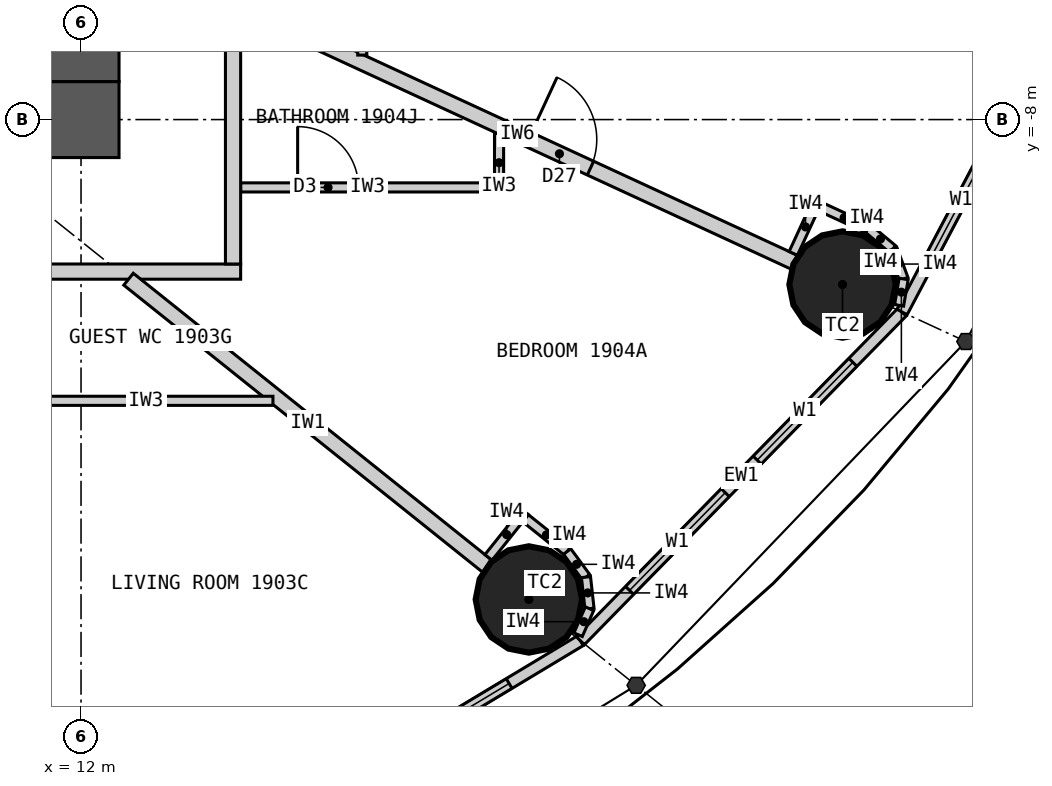
"""IFC4 building model, lengths in metres.
Left out: names, types, materials, properties, quantities, classifications, styles, units other than length and angle.
Written with IfcOpenShell. Run it as: python <this file> out.ifc"""

import sys

from ifc_helpers import new_model, si_unit, direction, frame, frame_2d, origin, origin_2d, place, context, subcontext, project, spatial, rectangle, circle, extrude, element, fill, save


model = new_model("IFC4")
c1 = context("Model", 3, precision=1e-05, world=origin(), true_north=direction((0.0, 1.0)))
c2 = subcontext(c1, "Body", "Model", "MODEL_VIEW")
j1 = project(units=[si_unit("LENGTHUNIT", "METRE"), si_unit("PLANEANGLEUNIT", "RADIAN")], contexts=[c1])
p1 = place(None, origin())
s1 = spatial("IfcSite", under=j1, at=p1, CompositionType="ELEMENT")
p2 = place(p1, origin())
s2 = spatial("IfcBuilding", under=s1, at=p2, CompositionType="ELEMENT")
p3 = place(p2, frame((0.0, 0.0, 77.1)))
s3 = spatial("IfcBuildingStorey", under=s2, at=p3, CompositionType="ELEMENT", Elevation=77.1)
for number, where, z_axis, x_axis in (
    (1, (17.892, -14.313, 0.0), (0.0, 0.0, 1.0), (1.0, 0.0, 0.0)),
    (2, (22.019, -10.17, 0.0), (0.0, 0.0, 1.0), (1.0, 0.0, 0.0)),
):
    element("IfcColumn", number, at=place(p3, frame(where, z_axis=z_axis, x_axis=x_axis)), inside=s3, PredefinedType="COLUMN", context=c2, shape_type="SweptSolid", body=[
        extrude(circle(Radius=0.7, at=origin_2d()), origin(), (0.0, 0.0, 1.0), 3.3),
    ])
p4 = place(p3, frame((12.5, -8.0, 0.0), z_axis=(0.0, 0.0, 1.0), x_axis=(-1.0, 0.0, 0.0)))
e3 = element("IfcWall", 3, at=p4, inside=s3, PredefinedType="SHEAR", context=c2, shape_type="SweptSolid", body=[
    extrude(rectangle(XDim=25.0, YDim=1.0, at=frame_2d((12.5, 0.0))), origin(), (0.0, 0.0, 1.0), 3.3),
])
p5 = place(p4, frame((11.2, 0.0, 0.0)))
e4 = element("IfcOpeningElement", 4, at=p5, cuts=e3, PredefinedType="OPENING", context=c2, shape_type="SweptSolid", body=[
    extrude(rectangle(XDim=1.2, YDim=2.2, at=frame_2d((0.6, 1.1))), frame((0.0, 0.51, 0.0), z_axis=(0.0, -1.0, 0.0), x_axis=(1.0, 0.0, 0.0)), (0.0, 0.0, 1.0), 1.02),
])
p6 = place(p4, frame((18.8, 0.0, 0.0)))
e5 = element("IfcOpeningElement", 5, at=p6, cuts=e3, PredefinedType="OPENING", context=c2, shape_type="SweptSolid", body=[
    extrude(rectangle(XDim=0.9, YDim=2.2, at=frame_2d((0.45, 1.1))), frame((0.0, 0.51, 0.0), z_axis=(0.0, -1.0, 0.0), x_axis=(1.0, 0.0, 0.0)), (0.0, 0.0, 1.0), 1.02),
])
p7 = place(p3, frame((12.0, -7.5, 0.0), z_axis=(0.0, 0.0, 1.0), x_axis=(0.0, 1.0, 0.0)))
e6 = element("IfcWall", 6, at=p7, inside=s3, PredefinedType="SHEAR", context=c2, shape_type="SweptSolid", body=[
    extrude(rectangle(XDim=15.0, YDim=1.0, at=frame_2d((7.5, 0.0))), origin(), (0.0, 0.0, 1.0), 3.3),
])
p8 = place(p7, frame((6.6, 0.0, 0.0)))
e7 = element("IfcOpeningElement", 7, at=p8, cuts=e6, PredefinedType="OPENING", context=c2, shape_type="SweptSolid", body=[
    extrude(rectangle(XDim=1.8, YDim=2.2, at=frame_2d((0.9, 1.1))), frame((0.0, 0.51, 0.0), z_axis=(0.0, -1.0, 0.0), x_axis=(1.0, 0.0, 0.0)), (0.0, 0.0, 1.0), 1.02),
])
p9 = place(p3, frame((13.096, -18.147, 0.0), z_axis=(0.0, 0.0, 1.0), x_axis=(0.856983180864, 0.515344377787, 0.0)))
e8 = element("IfcWall", 8, at=p9, inside=s3, PredefinedType="ELEMENTEDWALL", context=c2, shape_type="SweptSolid", body=[
    extrude(rectangle(XDim=6.386, YDim=0.15, at=frame_2d((3.193, 0.0))), origin(), (0.0, 0.0, 1.0), 3.12),
])
p10 = place(p9, frame((1.093, 0.0, 0.9)))
e9 = element("IfcOpeningElement", 9, at=p10, cuts=e8, PredefinedType="OPENING", context=c2, shape_type="SweptSolid", body=[
    extrude(rectangle(XDim=1.8, YDim=1.9, at=frame_2d((0.9, 0.95))), frame((0.0, 0.085, 0.0), z_axis=(0.0, -1.0, 0.0), x_axis=(1.0, 0.0, 0.0)), (0.0, 0.0, 1.0), 0.17),
])
p11 = place(p9, frame((3.493, 0.0, 0.9)))
e10 = element("IfcOpeningElement", 10, at=p11, cuts=e8, PredefinedType="OPENING", context=c2, shape_type="SweptSolid", body=[
    extrude(rectangle(XDim=1.8, YDim=1.9, at=frame_2d((0.9, 0.95))), frame((0.0, 0.085, 0.0), z_axis=(0.0, -1.0, 0.0), x_axis=(1.0, 0.0, 0.0)), (0.0, 0.0, 1.0), 0.17),
])
p12 = place(p3, frame((18.57, -14.856, 0.0), z_axis=(0.0, 0.0, 1.0), x_axis=(0.699602905915, 0.714531856557, 0.0)))
e11 = element("IfcWall", 11, at=p12, inside=s3, PredefinedType="ELEMENTEDWALL", context=c2, shape_type="SweptSolid", body=[
    extrude(rectangle(XDim=6.051, YDim=0.15, at=frame_2d((3.025, 0.0))), origin(), (0.0, 0.0, 1.0), 3.12),
])
p13 = place(p12, frame((0.926, 0.0, 0.9)))
e12 = element("IfcOpeningElement", 12, at=p13, cuts=e11, PredefinedType="OPENING", context=c2, shape_type="SweptSolid", body=[
    extrude(rectangle(XDim=1.8, YDim=1.9, at=frame_2d((0.9, 0.95))), frame((0.0, 0.085, 0.0), z_axis=(0.0, -1.0, 0.0), x_axis=(1.0, 0.0, 0.0)), (0.0, 0.0, 1.0), 0.17),
])
p14 = place(p12, frame((3.325, 0.0, 0.9)))
e13 = element("IfcOpeningElement", 13, at=p14, cuts=e11, PredefinedType="OPENING", context=c2, shape_type="SweptSolid", body=[
    extrude(rectangle(XDim=1.8, YDim=1.9, at=frame_2d((0.9, 0.95))), frame((0.0, 0.085, 0.0), z_axis=(0.0, -1.0, 0.0), x_axis=(1.0, 0.0, 0.0)), (0.0, 0.0, 1.0), 0.17),
])
p15 = place(p3, frame((22.803, -10.532, 0.0), z_axis=(0.0, 0.0, 1.0), x_axis=(0.467296867008, 0.884100468321, 0.0)))
e14 = element("IfcWall", 14, at=p15, inside=s3, PredefinedType="ELEMENTEDWALL", context=c2, shape_type="SweptSolid", body=[
    extrude(rectangle(XDim=5.734, YDim=0.15, at=frame_2d((2.867, 0.0))), origin(), (0.0, 0.0, 1.0), 3.12),
])
p16 = place(p15, frame((0.767, 0.0, 0.9)))
e15 = element("IfcOpeningElement", 15, at=p16, cuts=e14, PredefinedType="OPENING", context=c2, shape_type="SweptSolid", body=[
    extrude(rectangle(XDim=1.8, YDim=1.9, at=frame_2d((0.9, 0.95))), frame((0.0, 0.085, 0.0), z_axis=(0.0, -1.0, 0.0), x_axis=(1.0, 0.0, 0.0)), (0.0, 0.0, 1.0), 0.17),
])
p17 = place(p15, frame((3.167, 0.0, 0.9)))
e16 = element("IfcOpeningElement", 16, at=p17, cuts=e14, PredefinedType="OPENING", context=c2, shape_type="SweptSolid", body=[
    extrude(rectangle(XDim=1.8, YDim=1.9, at=frame_2d((0.9, 0.95))), frame((0.0, 0.085, 0.0), z_axis=(0.0, -1.0, 0.0), x_axis=(1.0, 0.0, 0.0)), (0.0, 0.0, 1.0), 0.17),
])
p18 = place(p3, frame((14.1, -10.0, 0.0), z_axis=(0.0, 0.0, 1.0), x_axis=(-1.0, 0.0, 0.0)))
e17 = element("IfcWall", 17, at=p18, inside=s3, PredefinedType="PARTITIONING", context=c2, shape_type="SweptSolid", body=[
    extrude(rectangle(XDim=28.2, YDim=0.2, at=frame_2d((14.1, 0.0))), origin(), (0.0, 0.0, 1.0), 3.12),
])
p19 = place(p18, frame((24.165, 0.0, 0.0)))
e18 = element("IfcOpeningElement", 18, at=p19, cuts=e17, PredefinedType="OPENING", context=c2, shape_type="SweptSolid", body=[
    extrude(rectangle(XDim=1.0, YDim=2.2, at=frame_2d((0.5, 1.1))), frame((0.0, 0.11, 0.0), z_axis=(0.0, -1.0, 0.0), x_axis=(1.0, 0.0, 0.0)), (0.0, 0.0, 1.0), 0.22),
])
p20 = place(p18, frame((14.923, 0.0, 0.0)))
e19 = element("IfcOpeningElement", 19, at=p20, cuts=e17, PredefinedType="OPENING", context=c2, shape_type="SweptSolid", body=[
    extrude(rectangle(XDim=1.0, YDim=2.2, at=frame_2d((0.5, 1.1))), frame((0.0, 0.11, 0.0), z_axis=(0.0, -1.0, 0.0), x_axis=(1.0, 0.0, 0.0)), (0.0, 0.0, 1.0), 0.22),
])
p21 = place(p18, frame((3.035, 0.0, 0.0)))
e20 = element("IfcOpeningElement", 20, at=p21, cuts=e17, PredefinedType="OPENING", context=c2, shape_type="SweptSolid", body=[
    extrude(rectangle(XDim=1.0, YDim=2.2, at=frame_2d((0.5, 1.1))), frame((0.0, 0.11, 0.0), z_axis=(0.0, -1.0, 0.0), x_axis=(1.0, 0.0, 0.0)), (0.0, 0.0, 1.0), 0.22),
])
p22 = place(p3, frame((7.289, -10.1, 0.0), z_axis=(0.0, 0.0, 1.0), x_axis=(0.585198353053, -0.810890182197, 0.0)))
e21 = element("IfcWall", 21, at=p22, inside=s3, PredefinedType="PARTITIONING", context=c2, shape_type="SweptSolid", body=[
    extrude(rectangle(XDim=8.36, YDim=0.2, at=frame_2d((4.18, 0.0))), origin(), (0.0, 0.0, 1.0), 2.32),
])
p23 = place(p22, frame((0.72, 0.0, 0.0)))
e22 = element("IfcOpeningElement", 22, at=p23, cuts=e21, PredefinedType="OPENING", context=c2, shape_type="SweptSolid", body=[
    extrude(rectangle(XDim=0.9, YDim=2.1, at=frame_2d((0.45, 1.05))), frame((0.0, 0.11, 0.0), z_axis=(0.0, -1.0, 0.0), x_axis=(1.0, 0.0, 0.0)), (0.0, 0.0, 1.0), 0.22),
])
p24 = place(p3, frame((12.625, -10.1, 0.0), z_axis=(0.0, 0.0, 1.0), x_axis=(0.780892451574, -0.624665493744, 0.0)))
e23 = element("IfcWall", 23, at=p24, inside=s3, PredefinedType="PARTITIONING", context=c2, shape_type="SweptSolid", body=[
    extrude(rectangle(XDim=6.045, YDim=0.2, at=frame_2d((3.022, 0.0))), origin(), (0.0, 0.0, 1.0), 2.32),
])
p25 = place(p3, frame((14.1, -6.512, 0.0), z_axis=(0.0, 0.0, 1.0), x_axis=(0.907832871056, -0.419332181247, 0.0)))
e24 = element("IfcWall", 24, at=p25, inside=s3, PredefinedType="PARTITIONING", context=c2, shape_type="SweptSolid", body=[
    extrude(rectangle(XDim=8.023, YDim=0.2, at=frame_2d((4.011, 0.0))), origin(), (0.0, 0.0, 1.0), 2.32),
])
p26 = place(p25, frame((4.17, 0.0, 0.0)))
e25 = element("IfcOpeningElement", 25, at=p26, cuts=e24, PredefinedType="OPENING", context=c2, shape_type="SweptSolid", body=[
    extrude(rectangle(XDim=0.9, YDim=2.1, at=frame_2d((0.45, 1.05))), frame((0.0, 0.11, 0.0), z_axis=(0.0, -1.0, 0.0), x_axis=(1.0, 0.0, 0.0)), (0.0, 0.0, 1.0), 0.22),
])
p27 = place(p3, frame((14.525, -11.7, 0.0), z_axis=(0.0, 0.0, 1.0), x_axis=(-1.0, 0.0, 0.0)))
e26 = element("IfcWall", 26, at=p27, inside=s3, PredefinedType="PARTITIONING", context=c2, shape_type="SweptSolid", body=[
    extrude(rectangle(XDim=3.34, YDim=0.12, at=frame_2d((1.67, 0.0))), origin(), (0.0, 0.0, 1.0), 3.12),
])
p28 = place(p3, frame((17.5, -8.183, 0.0), z_axis=(0.0, 0.0, 1.0), x_axis=(0.0, -1.0, 0.0)))
e27 = element("IfcWall", 27, at=p28, inside=s3, PredefinedType="PARTITIONING", context=c2, shape_type="SweptSolid", body=[
    extrude(rectangle(XDim=0.77, YDim=0.12, at=frame_2d((0.385, 0.0))), origin(), (0.0, 0.0, 1.0), 3.12),
])
p29 = place(p3, frame((14.1, -8.893, 0.0), z_axis=(0.0, 0.0, 1.0), x_axis=(1.0, 0.0, 0.0)))
e28 = element("IfcWall", 28, at=p29, inside=s3, PredefinedType="PARTITIONING", context=c2, shape_type="SweptSolid", body=[
    extrude(rectangle(XDim=3.34, YDim=0.12, at=frame_2d((1.67, 0.0))), origin(), (0.0, 0.0, 1.0), 3.12),
])
p30 = place(p29, frame((0.75, 0.0, 0.0)))
e29 = element("IfcOpeningElement", 29, at=p30, cuts=e28, PredefinedType="OPENING", context=c2, shape_type="SweptSolid", body=[
    extrude(rectangle(XDim=0.8, YDim=2.1, at=frame_2d((0.4, 1.05))), frame((0.0, 0.07, 0.0), z_axis=(0.0, -1.0, 0.0), x_axis=(1.0, 0.0, 0.0)), (0.0, 0.0, 1.0), 0.14),
])
p31 = place(p3, frame((15.7, -7.152, 0.0), z_axis=(0.0, 0.0, 1.0), x_axis=(0.0, 1.0, 0.0)))
e30 = element("IfcWall", 30, at=p31, inside=s3, PredefinedType="PARTITIONING", context=c2, shape_type="SweptSolid", body=[
    extrude(rectangle(XDim=2.079, YDim=0.12, at=frame_2d((1.04, 0.0))), origin(), (0.0, 0.0, 1.0), 3.12),
])
p32 = place(p3, frame((14.0, -9.9, 0.0), z_axis=(0.0, 0.0, 1.0), x_axis=(0.0, 1.0, 0.0)))
e31 = element("IfcWall", 31, at=p32, inside=s3, PredefinedType="PARTITIONING", context=c2, shape_type="SweptSolid", body=[
    extrude(rectangle(XDim=13.232, YDim=0.2, at=frame_2d((6.616, 0.0))), origin(), (0.0, 0.0, 1.0), 3.12),
])
p33 = place(p32, frame((4.948, 0.0, 0.0)))
e32 = element("IfcOpeningElement", 32, at=p33, cuts=e31, PredefinedType="OPENING", context=c2, shape_type="SweptSolid", body=[
    extrude(rectangle(XDim=1.0, YDim=2.2, at=frame_2d((0.5, 1.1))), frame((0.0, 0.11, 0.0), z_axis=(0.0, -1.0, 0.0), x_axis=(1.0, 0.0, 0.0)), (0.0, 0.0, 1.0), 0.22),
])
p34 = place(p32, frame((8.718, 0.0, 0.0)))
e33 = element("IfcOpeningElement", 33, at=p34, cuts=e31, PredefinedType="OPENING", context=c2, shape_type="SweptSolid", body=[
    extrude(rectangle(XDim=1.0, YDim=2.2, at=frame_2d((0.5, 1.1))), frame((0.0, 0.11, 0.0), z_axis=(0.0, -1.0, 0.0), x_axis=(1.0, 0.0, 0.0)), (0.0, 0.0, 1.0), 0.22),
])
p35 = place(p32, frame((11.74, 0.0, 0.0)))
e34 = element("IfcOpeningElement", 34, at=p35, cuts=e31, PredefinedType="OPENING", context=c2, shape_type="SweptSolid", body=[
    extrude(rectangle(XDim=1.0, YDim=2.2, at=frame_2d((0.5, 1.1))), frame((0.0, 0.11, 0.0), z_axis=(0.0, -1.0, 0.0), x_axis=(1.0, 0.0, 0.0)), (0.0, 0.0, 1.0), 0.22),
])
p36 = place(p3, frame((17.361, -13.76, 0.0), z_axis=(0.0, 0.0, 1.0), x_axis=(0.624501042889, 0.781023973659, 0.0)))
e35 = element("IfcWall", 35, at=p36, inside=s3, PredefinedType="PARTITIONING", context=c2, shape_type="SweptSolid", body=[
    extrude(rectangle(XDim=0.767, YDim=0.12, at=frame_2d((0.384, 0.0))), origin(), (0.0, 0.0, 1.0), 3.12),
])
p37 = place(p3, frame((17.85, -13.246, 0.0), z_axis=(0.0, 0.0, 1.0), x_axis=(0.780902834923, -0.62465251333, 0.0)))
e36 = element("IfcWall", 36, at=p37, inside=s3, PredefinedType="PARTITIONING", context=c2, shape_type="SweptSolid", body=[
    extrude(rectangle(XDim=0.7, YDim=0.12, at=frame_2d((0.35, 0.0))), origin(), (0.0, 0.0, 1.0), 3.12),
])
for number, where, z_axis, x_axis in (
    (37, (18.396, -13.683, 0.0), (0.0, 0.0, 1.0), (0.592, -0.806, 0.0)),
    (38, (18.644, -14.02, 0.0), (0.0, 0.0, 1.0), (0.11, -0.994, 0.0)),
):
    element("IfcWall", number, at=place(p3, frame(where, z_axis=z_axis, x_axis=x_axis)), inside=s3, PredefinedType="PARTITIONING", context=c2, shape_type="SweptSolid", body=[
        extrude(rectangle(XDim=0.418, YDim=0.12, at=frame_2d((0.209, 0.0))), origin(), (0.0, 0.0, 1.0), 3.12),
    ])
p38 = place(p3, frame((18.69, -14.435, 0.0), z_axis=(0.0, 0.0, 1.0), x_axis=(-0.401093412634, -0.91603715773, 0.0)))
e39 = element("IfcWall", 39, at=p38, inside=s3, PredefinedType="PARTITIONING", context=c2, shape_type="SweptSolid", body=[
    extrude(rectangle(XDim=0.373, YDim=0.12, at=frame_2d((0.187, 0.0))), origin(), (0.0, 0.0, 1.0), 3.12),
])
p39 = place(p3, frame((21.371, -9.761, 0.0), z_axis=(0.0, 0.0, 1.0), x_axis=(0.419259891039, 0.907866258744, 0.0)))
e40 = element("IfcWall", 40, at=p39, inside=s3, PredefinedType="PARTITIONING", context=c2, shape_type="SweptSolid", body=[
    extrude(rectangle(XDim=0.768, YDim=0.12, at=frame_2d((0.384, 0.0))), origin(), (0.0, 0.0, 1.0), 3.12),
])
p40 = place(p3, frame((21.722, -9.144, 0.0), z_axis=(0.0, 0.0, 1.0), x_axis=(0.907877701396, -0.419235112208, 0.0)))
e41 = element("IfcWall", 41, at=p40, inside=s3, PredefinedType="PARTITIONING", context=c2, shape_type="SweptSolid", body=[
    extrude(rectangle(XDim=0.7, YDim=0.12, at=frame_2d((0.35, 0.0))), origin(), (0.0, 0.0, 1.0), 3.12),
])
p41 = place(p3, frame((22.358, -9.437, 0.0), z_axis=(0.0, 0.0, 1.0), x_axis=(0.768412687942, -0.639954639806, 0.0)))
e42 = element("IfcWall", 42, at=p41, inside=s3, PredefinedType="PARTITIONING", context=c2, shape_type="SweptSolid", body=[
    extrude(rectangle(XDim=0.418, YDim=0.12, at=frame_2d((0.209, 0.0))), origin(), (0.0, 0.0, 1.0), 3.12),
])
p42 = place(p3, frame((22.679, -9.705, 0.0), z_axis=(0.0, 0.0, 1.0), x_axis=(0.345164001646, -0.938542386879, 0.0)))
e43 = element("IfcWall", 43, at=p42, inside=s3, PredefinedType="PARTITIONING", context=c2, shape_type="SweptSolid", body=[
    extrude(rectangle(XDim=0.418, YDim=0.12, at=frame_2d((0.209, 0.0))), origin(), (0.0, 0.0, 1.0), 3.12),
])
p43 = place(p3, frame((22.823, -10.097, 0.0), z_axis=(0.0, 0.0, 1.0), x_axis=(-0.169674995186, -0.985500074079, 0.0)))
e44 = element("IfcWall", 44, at=p43, inside=s3, PredefinedType="PARTITIONING", context=c2, shape_type="SweptSolid", body=[
    extrude(rectangle(XDim=0.353, YDim=0.12, at=frame_2d((0.176, 0.0))), origin(), (0.0, 0.0, 1.0), 3.12),
])
p44 = place(p11, origin())
e45 = element("IfcWindow", 45, at=p44, inside=s3, PartitioningType="SINGLE_PANEL", PredefinedType="WINDOW", context=c2, shape_type="SweptSolid", body=[
    extrude(rectangle(XDim=1.8, YDim=1.9, at=frame_2d((0.9, 0.95))), frame((0.0, 0.03, 0.0), z_axis=(0.0, -1.0, 0.0), x_axis=(1.0, 0.0, 0.0)), (0.0, 0.0, 1.0), 0.06),
])
fill(e10, e45)
p45 = place(p13, origin())
e46 = element("IfcWindow", 46, at=p45, inside=s3, PartitioningType="SINGLE_PANEL", PredefinedType="WINDOW", context=c2, shape_type="SweptSolid", body=[
    extrude(rectangle(XDim=1.8, YDim=1.9, at=frame_2d((0.9, 0.95))), frame((0.0, 0.03, 0.0), z_axis=(0.0, -1.0, 0.0), x_axis=(1.0, 0.0, 0.0)), (0.0, 0.0, 1.0), 0.06),
])
fill(e12, e46)
p46 = place(p14, origin())
e47 = element("IfcWindow", 47, at=p46, inside=s3, PartitioningType="SINGLE_PANEL", PredefinedType="WINDOW", context=c2, shape_type="SweptSolid", body=[
    extrude(rectangle(XDim=1.8, YDim=1.9, at=frame_2d((0.9, 0.95))), frame((0.0, 0.03, 0.0), z_axis=(0.0, -1.0, 0.0), x_axis=(1.0, 0.0, 0.0)), (0.0, 0.0, 1.0), 0.06),
])
fill(e13, e47)
p47 = place(p16, origin())
e48 = element("IfcWindow", 48, at=p47, inside=s3, PartitioningType="SINGLE_PANEL", PredefinedType="WINDOW", context=c2, shape_type="SweptSolid", body=[
    extrude(rectangle(XDim=1.8, YDim=1.9, at=frame_2d((0.9, 0.95))), frame((0.0, 0.03, 0.0), z_axis=(0.0, -1.0, 0.0), x_axis=(1.0, 0.0, 0.0)), (0.0, 0.0, 1.0), 0.06),
])
fill(e15, e48)
p48 = place(p30, origin())
e49 = element("IfcDoor", 49, at=p48, inside=s3, OperationType="SINGLE_SWING_LEFT", PredefinedType="DOOR", context=c2, shape_type="SweptSolid", body=[
    extrude(rectangle(XDim=0.8, YDim=2.1, at=frame_2d((0.4, 1.05))), frame((0.0, 0.025, 0.0), z_axis=(0.0, -1.0, 0.0), x_axis=(1.0, 0.0, 0.0)), (0.0, 0.0, 1.0), 0.05),
])
fill(e29, e49)
p49 = place(p26, origin())
e50 = element("IfcDoor", 50, at=p49, inside=s3, OperationType="SINGLE_SWING_LEFT", PredefinedType="DOOR", context=c2, shape_type="SweptSolid", body=[
    extrude(rectangle(XDim=0.9, YDim=2.1, at=frame_2d((0.45, 1.05))), frame((0.0, 0.025, 0.0), z_axis=(0.0, -1.0, 0.0), x_axis=(1.0, 0.0, 0.0)), (0.0, 0.0, 1.0), 0.05),
])
fill(e25, e50)
save(model, sys.argv[1])
